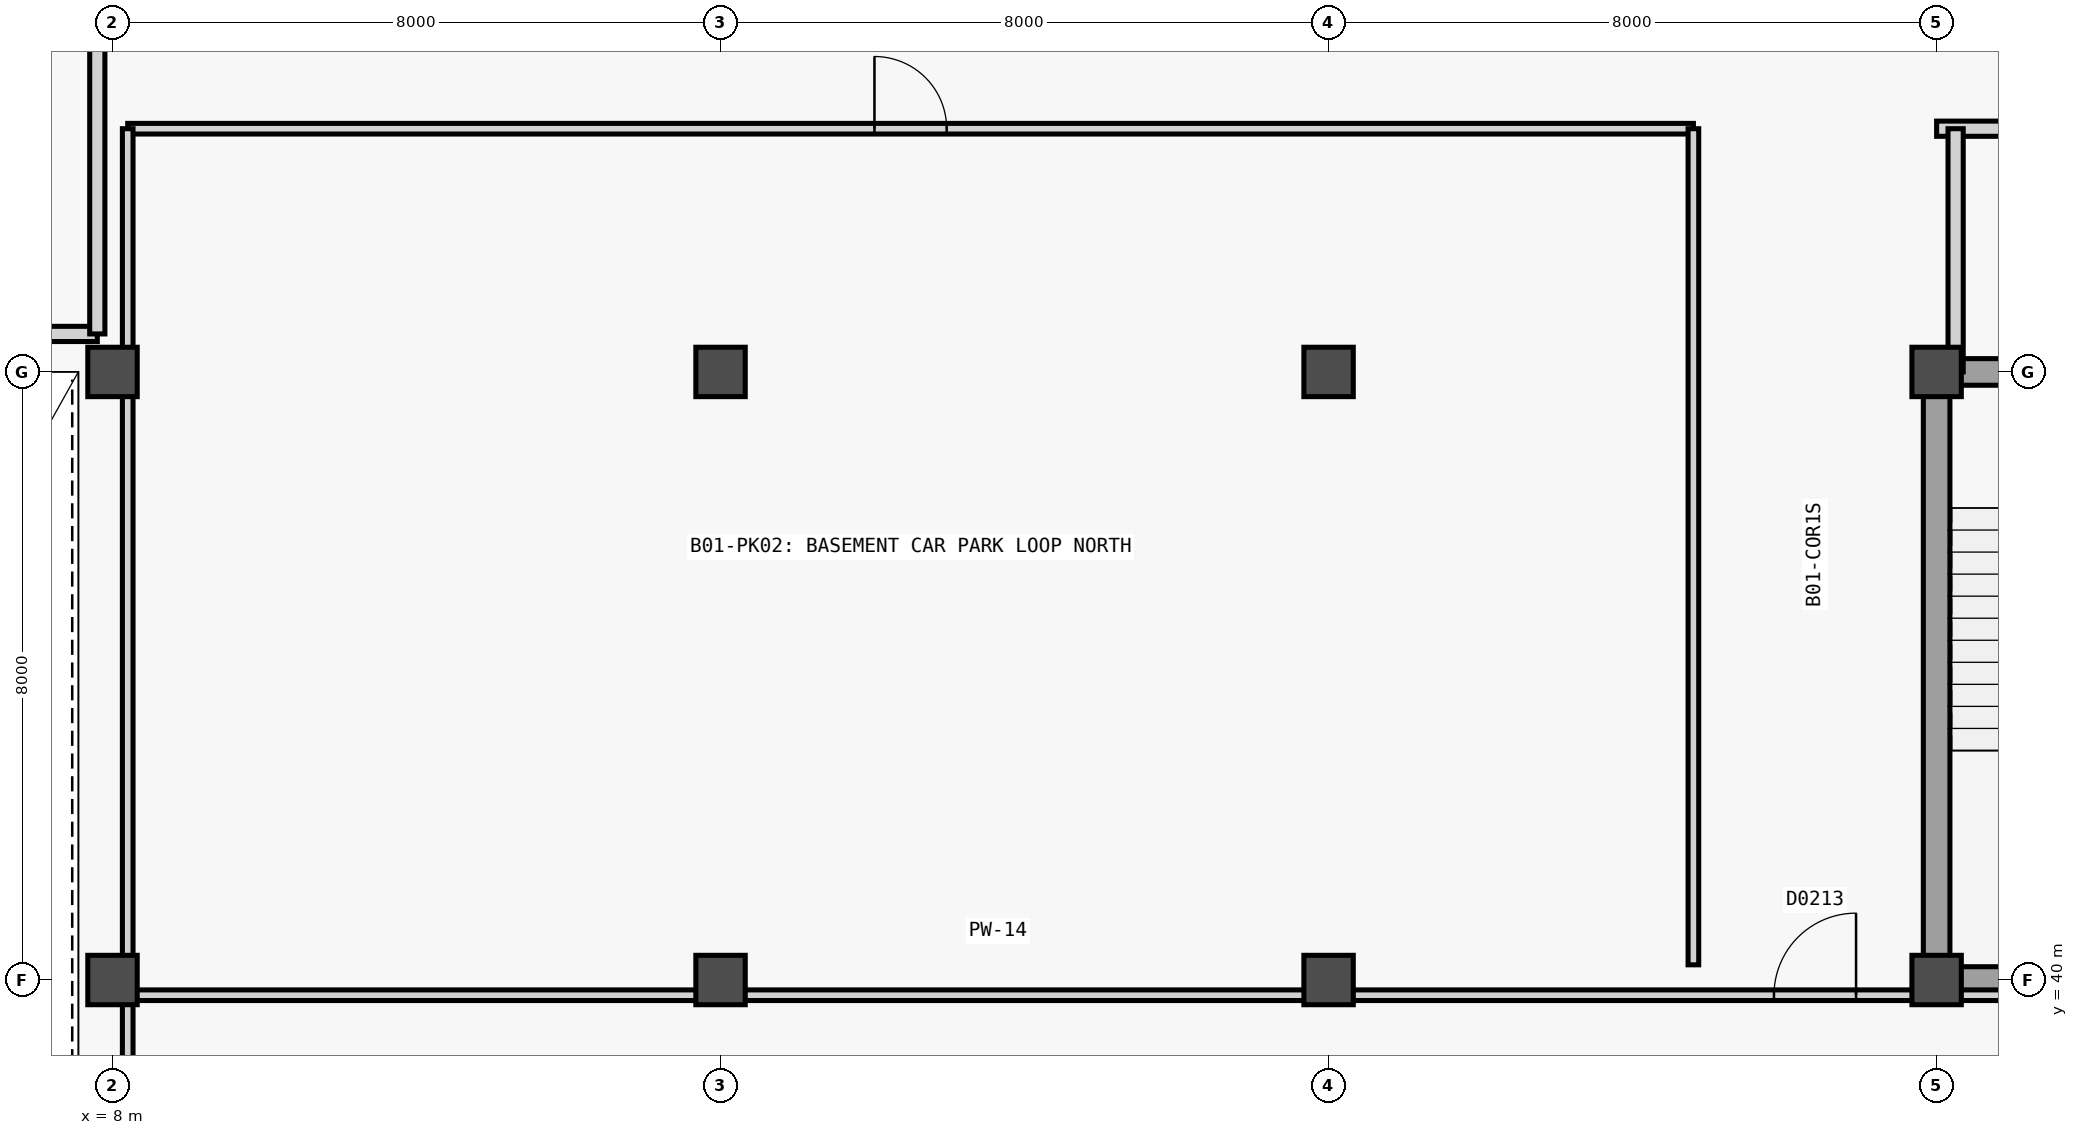
"""IFC4 building model, lengths in metres.
Left out: names, types, materials, properties, quantities, classifications, styles, units other than length and angle.
Written with IfcOpenShell. Run it as: python <this file> out.ifc"""

import sys

from ifc_helpers import new_model, si_unit, direction, frame, frame_2d, origin, origin_2d, place, context, subcontext, project, spatial, rectangle, extrude, element, fill, save


model = new_model("IFC4")
c1 = context("Model", 3, precision=1e-05, world=origin(), true_north=direction((0.0, 1.0)))
c2 = subcontext(c1, "Body", "Model", "MODEL_VIEW")
j1 = project(units=[si_unit("LENGTHUNIT", "METRE"), si_unit("PLANEANGLEUNIT", "RADIAN")], contexts=[c1])
p1 = place(None, origin())
s1 = spatial("IfcSite", under=j1, at=p1, CompositionType="ELEMENT")
p2 = place(p1, origin())
s2 = spatial("IfcBuilding", under=s1, at=p2, CompositionType="ELEMENT")
p3 = place(p2, frame((0.0, 0.0, -4.5)))
s3 = spatial("IfcBuildingStorey", under=s2, at=p3, CompositionType="ELEMENT", Elevation=-4.5)
for number, where, z_axis, x_axis in (
    (1, (8.0, 40.0, -0.45), (0.0, 0.0, 1.0), (1.0, 0.0, 0.0)),
    (2, (8.0, 48.0, -0.45), (0.0, 0.0, 1.0), (1.0, 0.0, 0.0)),
    (3, (16.0, 40.0, -0.45), (0.0, 0.0, 1.0), (1.0, 0.0, 0.0)),
    (4, (16.0, 48.0, -0.45), (0.0, 0.0, 1.0), (1.0, 0.0, 0.0)),
    (5, (24.0, 40.0, -0.45), (0.0, 0.0, 1.0), (1.0, 0.0, 0.0)),
    (6, (24.0, 48.0, -0.45), (0.0, 0.0, 1.0), (1.0, 0.0, 0.0)),
    (7, (32.0, 40.0, -0.45), (0.0, 0.0, 1.0), (1.0, 0.0, 0.0)),
    (8, (32.0, 48.0, -0.45), (0.0, 0.0, 1.0), (1.0, 0.0, 0.0)),
):
    element("IfcColumn", number, at=place(p3, frame(where, z_axis=z_axis, x_axis=x_axis)), inside=s3, PredefinedType="COLUMN", context=c2, shape_type="SweptSolid", body=[
        extrude(rectangle(XDim=0.65, YDim=0.65, at=origin_2d()), origin(), (0.0, 0.0, 1.0), 4.95),
    ])
for number, where, z_axis, x_axis in (
    (9, (32.0, 40.0, 0.0), (0.0, 0.0, 1.0), (1.0, 0.0, 0.0)),
    (10, (32.0, 40.0, 0.0), (0.0, 0.0, 1.0), (0.0, 1.0, 0.0)),
):
    element("IfcWall", number, at=place(p3, frame(where, z_axis=z_axis, x_axis=x_axis)), inside=s3, PredefinedType="SHEAR", context=c2, shape_type="SweptSolid", body=[
        extrude(rectangle(XDim=8.0, YDim=0.35, at=frame_2d((4.0, 0.0))), origin(), (0.0, 0.0, 1.0), 4.5),
    ])
p4 = place(p3, frame((32.0, 48.0, 0.0), z_axis=(0.0, 0.0, 1.0), x_axis=(1.0, 0.0, 0.0)))
e11 = element("IfcWall", 11, at=p4, inside=s3, PredefinedType="SHEAR", context=c2, shape_type="SweptSolid", body=[
    extrude(rectangle(XDim=8.0, YDim=0.35, at=frame_2d((4.0, 0.0))), origin(), (0.0, 0.0, 1.0), 4.5),
])
p5 = place(p4, frame((1.98, 0.0, 0.0)))
e12 = element("IfcOpeningElement", 12, at=p5, cuts=e11, PredefinedType="OPENING", context=c2, shape_type="SweptSolid", body=[
    extrude(rectangle(XDim=1.15, YDim=2.2, at=frame_2d((0.575, 1.1))), frame((0.0, 0.185, 0.0), z_axis=(0.0, -1.0, 0.0), x_axis=(1.0, 0.0, 0.0)), (0.0, 0.0, 1.0), 0.37),
])
p6 = place(p4, frame((4.25, 0.0, 0.0)))
e13 = element("IfcOpeningElement", 13, at=p6, cuts=e11, PredefinedType="OPENING", context=c2, shape_type="SweptSolid", body=[
    extrude(rectangle(XDim=1.0, YDim=2.15, at=frame_2d((0.5, 1.075))), frame((0.0, 0.185, 0.0), z_axis=(0.0, -1.0, 0.0), x_axis=(1.0, 0.0, 0.0)), (0.0, 0.0, 1.0), 0.37),
])
p7 = place(p4, frame((6.2, 0.0, 0.0)))
e14 = element("IfcOpeningElement", 14, at=p7, cuts=e11, PredefinedType="OPENING", context=c2, shape_type="SweptSolid", body=[
    extrude(rectangle(XDim=1.0, YDim=2.15, at=frame_2d((0.5, 1.075))), frame((0.0, 0.185, 0.0), z_axis=(0.0, -1.0, 0.0), x_axis=(1.0, 0.0, 0.0)), (0.0, 0.0, 1.0), 0.37),
])
p8 = place(p3, frame((32.0, 51.2, 0.0), z_axis=(0.0, 0.0, 1.0), x_axis=(1.0, 0.0, 0.0)))
e15 = element("IfcWall", 15, at=p8, inside=s3, PredefinedType="PARTITIONING", context=c2, shape_type="SweptSolid", body=[
    extrude(rectangle(XDim=7.75, YDim=0.2, at=frame_2d((3.875, 0.0))), origin(), (0.0, 0.0, 1.0), 4.22),
])
p9 = place(p8, frame((3.375, 0.0, 0.0)))
e16 = element("IfcOpeningElement", 16, at=p9, cuts=e15, PredefinedType="OPENING", context=c2, shape_type="SweptSolid", body=[
    extrude(rectangle(XDim=1.05, YDim=2.15, at=frame_2d((0.525, 1.075))), frame((0.0, 0.11, 0.0), z_axis=(0.0, -1.0, 0.0), x_axis=(1.0, 0.0, 0.0)), (0.0, 0.0, 1.0), 0.22),
])
p10 = place(p3, frame((32.25, 48.0, 0.0), z_axis=(0.0, 0.0, 1.0), x_axis=(0.0, 1.0, 0.0)))
e17 = element("IfcWall", 17, at=p10, inside=s3, PredefinedType="PARTITIONING", context=c2, shape_type="SweptSolid", body=[
    extrude(rectangle(XDim=3.2, YDim=0.2, at=frame_2d((1.6, 0.0))), origin(), (0.0, 0.0, 1.0), 3.6),
])
p11 = place(p3, frame((8.2, 39.8, 0.0), z_axis=(0.0, 0.0, 1.0), x_axis=(1.0, 0.0, 0.0)))
e18 = element("IfcWall", 18, at=p11, inside=s3, PredefinedType="PARTITIONING", context=c2, shape_type="SweptSolid", body=[
    extrude(rectangle(XDim=45.8, YDim=0.14, at=frame_2d((22.9, 0.0))), origin(), (0.0, 0.0, 1.0), 3.45),
])
p12 = place(p11, frame((21.66, 0.0, 0.0)))
e19 = element("IfcOpeningElement", 19, at=p12, cuts=e18, PredefinedType="OPENING", context=c2, shape_type="SweptSolid", body=[
    extrude(rectangle(XDim=1.08, YDim=2.2, at=frame_2d((0.54, 1.1))), frame((0.0, 0.08, 0.0), z_axis=(0.0, -1.0, 0.0), x_axis=(1.0, 0.0, 0.0)), (0.0, 0.0, 1.0), 0.16),
])
p13 = place(p3, frame((8.2, 2.0, 0.0), z_axis=(0.0, 0.0, 1.0), x_axis=(0.0, 1.0, 0.0)))
e20 = element("IfcWall", 20, at=p13, inside=s3, PredefinedType="PARTITIONING", context=c2, shape_type="SweptSolid", body=[
    extrude(rectangle(XDim=37.8, YDim=0.14, at=frame_2d((18.9, 0.0))), origin(), (0.0, 0.0, 1.0), 3.6),
])
p14 = place(p3, frame((8.2, 51.2, 0.0), z_axis=(0.0, 0.0, 1.0), x_axis=(1.0, 0.0, 0.0)))
e21 = element("IfcWall", 21, at=p14, inside=s3, PredefinedType="PARTITIONING", context=c2, shape_type="SweptSolid", body=[
    extrude(rectangle(XDim=20.6, YDim=0.14, at=frame_2d((10.3, 0.0))), origin(), (0.0, 0.0, 1.0), 4.24),
])
p15 = place(p14, frame((9.825, 0.0, 0.0)))
e22 = element("IfcOpeningElement", 22, at=p15, cuts=e21, PredefinedType="OPENING", context=c2, shape_type="SweptSolid", body=[
    extrude(rectangle(XDim=0.95, YDim=2.1, at=frame_2d((0.475, 1.05))), frame((0.0, 0.08, 0.0), z_axis=(0.0, -1.0, 0.0), x_axis=(1.0, 0.0, 0.0)), (0.0, 0.0, 1.0), 0.16),
])
p16 = place(p3, frame((8.2, 40.2, 0.0), z_axis=(0.0, 0.0, 1.0), x_axis=(0.0, 1.0, 0.0)))
e23 = element("IfcWall", 23, at=p16, inside=s3, PredefinedType="PARTITIONING", context=c2, shape_type="SweptSolid", body=[
    extrude(rectangle(XDim=11.0, YDim=0.14, at=frame_2d((5.5, 0.0))), origin(), (0.0, 0.0, 1.0), 3.6),
])
p17 = place(p3, frame((28.8, 40.2, 0.0), z_axis=(0.0, 0.0, 1.0), x_axis=(0.0, 1.0, 0.0)))
e24 = element("IfcWall", 24, at=p17, inside=s3, PredefinedType="PARTITIONING", context=c2, shape_type="SweptSolid", body=[
    extrude(rectangle(XDim=11.0, YDim=0.14, at=frame_2d((5.5, 0.0))), origin(), (0.0, 0.0, 1.0), 4.24),
])
p18 = place(p3, frame((0.6, 48.5, 0.0), z_axis=(0.0, 0.0, 1.0), x_axis=(1.0, 0.0, 0.0)))
e25 = element("IfcWall", 25, at=p18, inside=s3, PredefinedType="PARTITIONING", context=c2, shape_type="SweptSolid", body=[
    extrude(rectangle(XDim=7.2, YDim=0.2, at=frame_2d((3.6, 0.0))), origin(), (0.0, 0.0, 1.0), 4.24),
])
p19 = place(p3, frame((7.8, 48.5, 0.0), z_axis=(0.0, 0.0, 1.0), x_axis=(0.0, 1.0, 0.0)))
e26 = element("IfcWall", 26, at=p19, inside=s3, PredefinedType="PARTITIONING", context=c2, shape_type="SweptSolid", body=[
    extrude(rectangle(XDim=14.0, YDim=0.2, at=frame_2d((7.0, 0.0))), origin(), (0.0, 0.0, 1.0), 3.6),
])
p20 = place(p19, frame((3.95, 0.0, 0.0)))
e27 = element("IfcOpeningElement", 27, at=p20, cuts=e26, PredefinedType="OPENING", context=c2, shape_type="SweptSolid", body=[
    extrude(rectangle(XDim=0.9, YDim=2.1, at=frame_2d((0.45, 1.05))), frame((0.0, 0.11, 0.0), z_axis=(0.0, -1.0, 0.0), x_axis=(1.0, 0.0, 0.0)), (0.0, 0.0, 1.0), 0.22),
])
p21 = place(p12, origin())
e28 = element("IfcDoor", 28, at=p21, inside=s3, OperationType="SINGLE_SWING_RIGHT", PredefinedType="DOOR", context=c2, shape_type="SweptSolid", body=[
    extrude(rectangle(XDim=1.08, YDim=2.2, at=frame_2d((0.54, 1.1))), frame((0.0, 0.025, 0.0), z_axis=(0.0, -1.0, 0.0), x_axis=(1.0, 0.0, 0.0)), (0.0, 0.0, 1.0), 0.05),
])
fill(e19, e28)
p22 = place(p15, origin())
e29 = element("IfcDoor", 29, at=p22, inside=s3, OperationType="SINGLE_SWING_LEFT", PredefinedType="DOOR", context=c2, shape_type="SweptSolid", body=[
    extrude(rectangle(XDim=0.95, YDim=2.1, at=frame_2d((0.475, 1.05))), frame((0.0, 0.025, 0.0), z_axis=(0.0, -1.0, 0.0), x_axis=(1.0, 0.0, 0.0)), (0.0, 0.0, 1.0), 0.05),
])
fill(e22, e29)
save(model, sys.argv[1])
